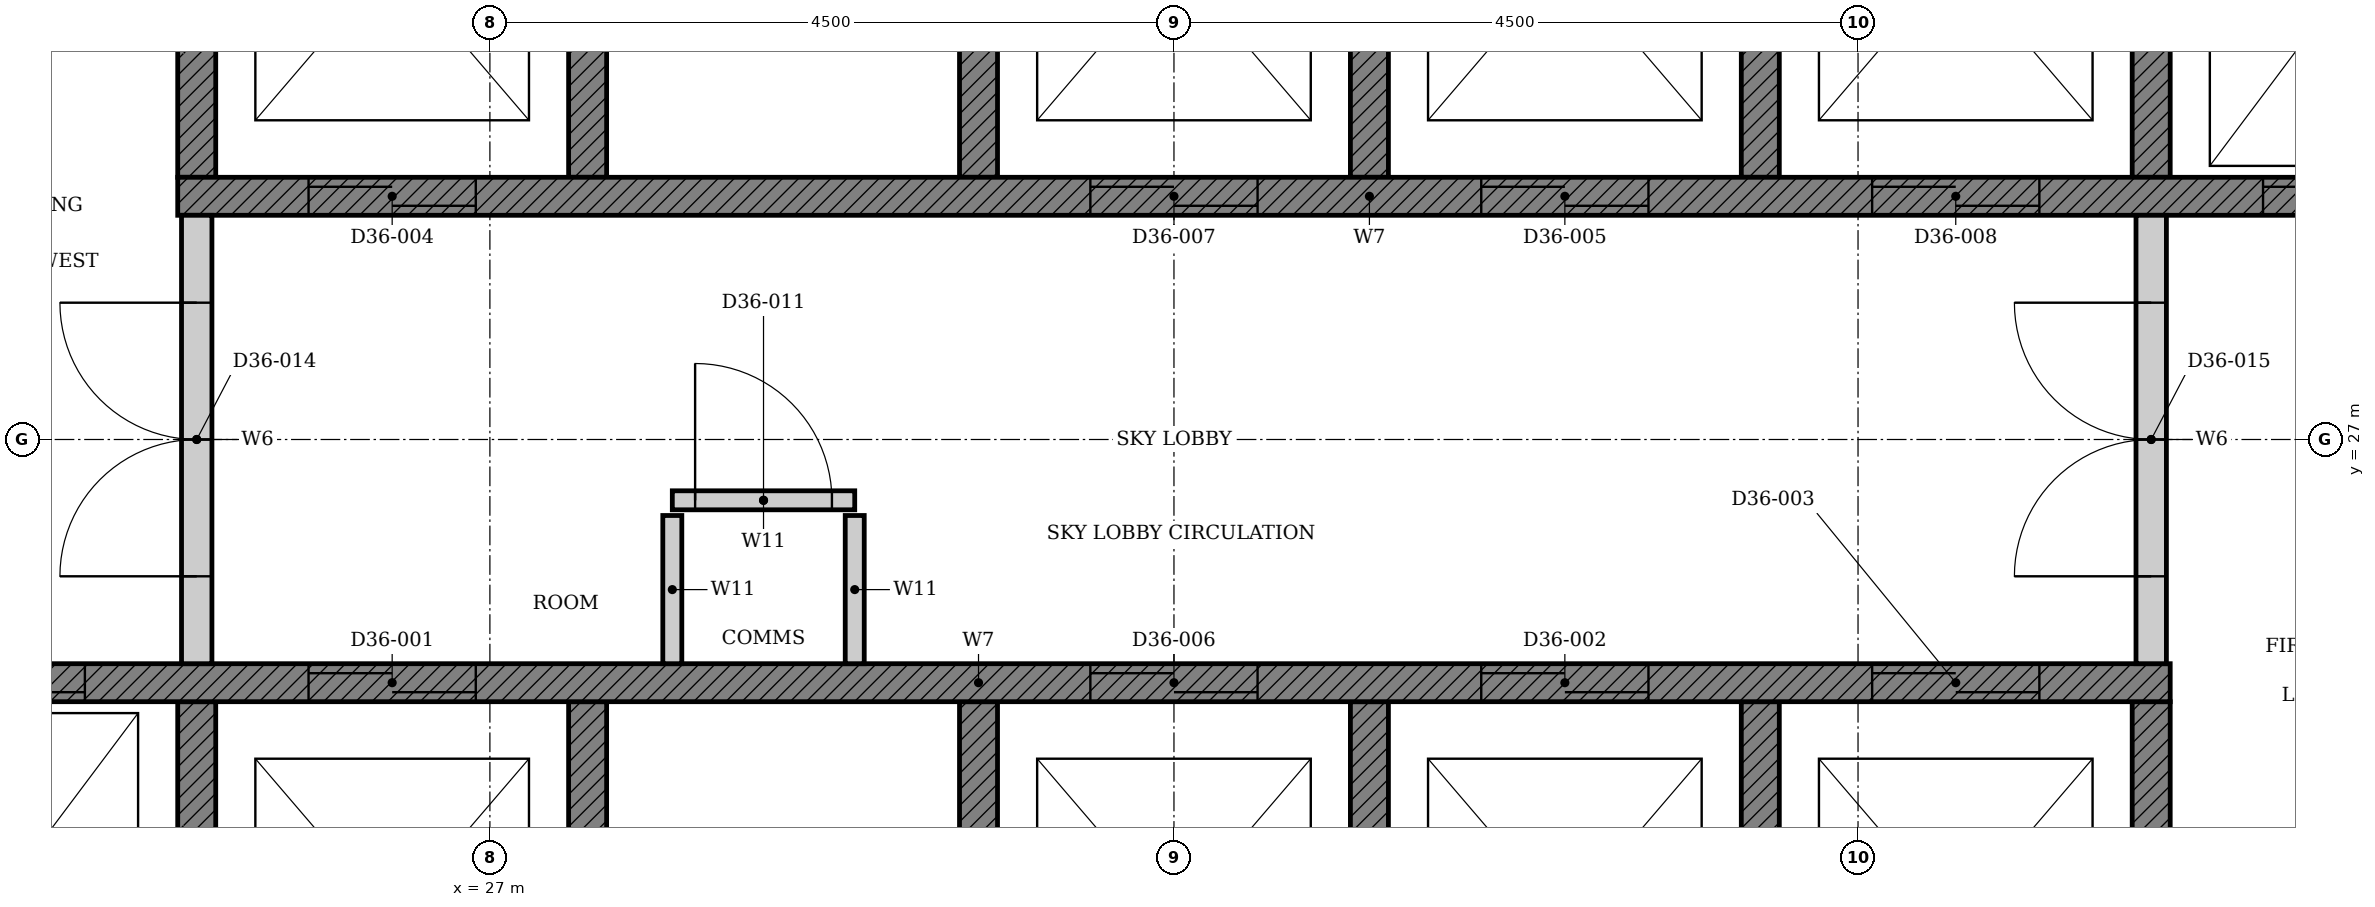
"""IFC4 building model, lengths in metres.
Left out: names, types, materials, properties, quantities, classifications, styles, units other than length and angle.
Written with IfcOpenShell. Run it as: python <this file> out.ifc"""

import sys

from ifc_helpers import new_model, si_unit, direction, frame, frame_2d, origin, place, context, subcontext, project, spatial, polyline, rectangle, outline, extrude, element, fill, save


model = new_model("IFC4")
c1 = context("Model", 3, precision=1e-05, world=origin(), true_north=direction((0.0, 1.0)))
c2 = subcontext(c1, "Body", "Model", "MODEL_VIEW")
j1 = project(units=[si_unit("LENGTHUNIT", "METRE"), si_unit("PLANEANGLEUNIT", "RADIAN")], contexts=[c1])
p1 = place(None, origin())
s1 = spatial("IfcSite", under=j1, at=p1, CompositionType="ELEMENT")
p2 = place(p1, origin())
s2 = spatial("IfcBuilding", under=s1, at=p2, CompositionType="ELEMENT")
p3 = place(p2, frame((0.0, 0.0, 145.2)))
s3 = spatial("IfcBuildingStorey", under=s2, at=p3, CompositionType="ELEMENT", Elevation=145.2)
p4 = place(p3, origin())
e1 = element("IfcWall", 1, at=p4, inside=s3, PredefinedType="SHEAR", context=c2, shape_type="SweptSolid", body=[
    extrude(outline(polyline([(22.375, 22.35), (38.053, 22.35), (38.053, 25.275), (37.803, 25.275), (37.803, 22.65), (35.482, 22.65), (35.482, 25.275), (35.232, 25.275), (35.232, 22.65), (32.911, 22.65), (32.911, 25.275), (32.661, 25.275), (32.661, 22.65), (30.339, 22.65), (30.339, 25.275), (30.089, 25.275), (30.089, 22.65), (27.768, 22.65), (27.768, 25.275), (27.518, 25.275), (27.518, 22.65), (25.197, 22.65), (25.197, 25.275), (24.947, 25.275), (24.947, 22.65), (22.625, 22.65), (22.625, 25.275), (22.375, 25.275), (22.375, 22.35)])), origin(), (0.0, 0.0, 1.0), 5.1),
])
p5 = place(p3, origin())
e2 = element("IfcWall", 2, at=p5, inside=s3, PredefinedType="SHEAR", context=c2, shape_type="SweptSolid", body=[
    extrude(outline(polyline([(24.947, 28.725), (25.197, 28.725), (25.197, 31.35), (27.518, 31.35), (27.518, 28.725), (27.768, 28.725), (27.768, 31.35), (30.089, 31.35), (30.089, 28.725), (30.339, 28.725), (30.339, 31.35), (32.661, 31.35), (32.661, 28.725), (32.911, 28.725), (32.911, 31.35), (35.232, 31.35), (35.232, 28.725), (35.482, 28.725), (35.482, 31.35), (37.803, 31.35), (37.803, 28.725), (38.053, 28.725), (38.053, 31.35), (40.375, 31.35), (40.375, 28.725), (40.625, 28.725), (40.625, 31.65), (24.947, 31.65), (24.947, 28.725)])), origin(), (0.0, 0.0, 1.0), 5.1),
])
p6 = place(p3, frame((22.375, 25.4, 0.0), z_axis=(0.0, 0.0, 1.0), x_axis=(1.0, 0.0, 0.0)))
e3 = element("IfcWall", 3, at=p6, inside=s3, PredefinedType="SHEAR", context=c2, shape_type="SweptSolid", body=[
    extrude(rectangle(XDim=15.678, YDim=0.25, at=frame_2d((7.839, 0.0))), origin(), (0.0, 0.0, 1.0), 5.1),
])
p7 = place(p6, frame((3.432, 0.0, 0.0)))
e4 = element("IfcOpeningElement", 4, at=p7, cuts=e3, PredefinedType="OPENING", context=c2, shape_type="SweptSolid", body=[
    extrude(rectangle(XDim=1.1, YDim=2.1, at=frame_2d((0.55, 1.05))), frame((0.0, 0.135, 0.0), z_axis=(0.0, -1.0, 0.0), x_axis=(1.0, 0.0, 0.0)), (0.0, 0.0, 1.0), 0.27),
])
p8 = place(p6, frame((11.146, 0.0, 0.0)))
e5 = element("IfcOpeningElement", 5, at=p8, cuts=e3, PredefinedType="OPENING", context=c2, shape_type="SweptSolid", body=[
    extrude(rectangle(XDim=1.1, YDim=2.1, at=frame_2d((0.55, 1.05))), frame((0.0, 0.135, 0.0), z_axis=(0.0, -1.0, 0.0), x_axis=(1.0, 0.0, 0.0)), (0.0, 0.0, 1.0), 0.27),
])
p9 = place(p6, frame((13.718, 0.0, 0.0)))
e6 = element("IfcOpeningElement", 6, at=p9, cuts=e3, PredefinedType="OPENING", context=c2, shape_type="SweptSolid", body=[
    extrude(rectangle(XDim=1.1, YDim=2.1, at=frame_2d((0.55, 1.05))), frame((0.0, 0.135, 0.0), z_axis=(0.0, -1.0, 0.0), x_axis=(1.0, 0.0, 0.0)), (0.0, 0.0, 1.0), 0.27),
])
p10 = place(p6, frame((8.575, 0.0, 0.0)))
e7 = element("IfcOpeningElement", 7, at=p10, cuts=e3, PredefinedType="OPENING", context=c2, shape_type="SweptSolid", body=[
    extrude(rectangle(XDim=1.1, YDim=2.1, at=frame_2d((0.55, 1.05))), frame((0.0, 0.135, 0.0), z_axis=(0.0, -1.0, 0.0), x_axis=(1.0, 0.0, 0.0)), (0.0, 0.0, 1.0), 0.27),
])
p11 = place(p6, frame((0.861, 0.0, 0.0)))
e8 = element("IfcOpeningElement", 8, at=p11, cuts=e3, PredefinedType="OPENING", context=c2, shape_type="SweptSolid", body=[
    extrude(rectangle(XDim=1.1, YDim=2.1, at=frame_2d((0.55, 1.05))), frame((0.0, 0.135, 0.0), z_axis=(0.0, -1.0, 0.0), x_axis=(1.0, 0.0, 0.0)), (0.0, 0.0, 1.0), 0.27),
])
p12 = place(p3, frame((24.947, 28.6, 0.0), z_axis=(0.0, 0.0, 1.0), x_axis=(1.0, 0.0, 0.0)))
e9 = element("IfcWall", 9, at=p12, inside=s3, PredefinedType="SHEAR", context=c2, shape_type="SweptSolid", body=[
    extrude(rectangle(XDim=15.678, YDim=0.25, at=frame_2d((7.839, 0.0))), origin(), (0.0, 0.0, 1.0), 5.1),
])
p13 = place(p12, frame((0.861, 0.0, 0.0)))
e10 = element("IfcOpeningElement", 10, at=p13, cuts=e9, PredefinedType="OPENING", context=c2, shape_type="SweptSolid", body=[
    extrude(rectangle(XDim=1.1, YDim=2.1, at=frame_2d((0.55, 1.05))), frame((0.0, 0.135, 0.0), z_axis=(0.0, -1.0, 0.0), x_axis=(1.0, 0.0, 0.0)), (0.0, 0.0, 1.0), 0.27),
])
p14 = place(p12, frame((8.575, 0.0, 0.0)))
e11 = element("IfcOpeningElement", 11, at=p14, cuts=e9, PredefinedType="OPENING", context=c2, shape_type="SweptSolid", body=[
    extrude(rectangle(XDim=1.1, YDim=2.1, at=frame_2d((0.55, 1.05))), frame((0.0, 0.135, 0.0), z_axis=(0.0, -1.0, 0.0), x_axis=(1.0, 0.0, 0.0)), (0.0, 0.0, 1.0), 0.27),
])
p15 = place(p12, frame((6.004, 0.0, 0.0)))
e12 = element("IfcOpeningElement", 12, at=p15, cuts=e9, PredefinedType="OPENING", context=c2, shape_type="SweptSolid", body=[
    extrude(rectangle(XDim=1.1, YDim=2.1, at=frame_2d((0.55, 1.05))), frame((0.0, 0.135, 0.0), z_axis=(0.0, -1.0, 0.0), x_axis=(1.0, 0.0, 0.0)), (0.0, 0.0, 1.0), 0.27),
])
p16 = place(p12, frame((11.146, 0.0, 0.0)))
e13 = element("IfcOpeningElement", 13, at=p16, cuts=e9, PredefinedType="OPENING", context=c2, shape_type="SweptSolid", body=[
    extrude(rectangle(XDim=1.1, YDim=2.1, at=frame_2d((0.55, 1.05))), frame((0.0, 0.135, 0.0), z_axis=(0.0, -1.0, 0.0), x_axis=(1.0, 0.0, 0.0)), (0.0, 0.0, 1.0), 0.27),
])
p17 = place(p12, frame((13.718, 0.0, 0.0)))
e14 = element("IfcOpeningElement", 14, at=p17, cuts=e9, PredefinedType="OPENING", context=c2, shape_type="SweptSolid", body=[
    extrude(rectangle(XDim=1.1, YDim=2.1, at=frame_2d((0.55, 1.05))), frame((0.0, 0.135, 0.0), z_axis=(0.0, -1.0, 0.0), x_axis=(1.0, 0.0, 0.0)), (0.0, 0.0, 1.0), 0.27),
])
p18 = place(p3, frame((28.2, 26.6, 0.0), z_axis=(0.0, 0.0, 1.0), x_axis=(1.0, 0.0, 0.0)))
e15 = element("IfcWall", 15, at=p18, inside=s3, PredefinedType="PARTITIONING", context=c2, shape_type="SweptSolid", body=[
    extrude(rectangle(XDim=1.2, YDim=0.125, at=frame_2d((0.6, 0.0))), origin(), (0.0, 0.0, 1.0), 5.1),
])
p19 = place(p18, frame((0.15, 0.0, 0.0)))
e16 = element("IfcOpeningElement", 16, at=p19, cuts=e15, PredefinedType="OPENING", context=c2, shape_type="SweptSolid", body=[
    extrude(rectangle(XDim=0.9, YDim=2.1, at=frame_2d((0.45, 1.05))), frame((0.0, 0.073, 0.0), z_axis=(0.0, -1.0, 0.0), x_axis=(1.0, 0.0, 0.0)), (0.0, 0.0, 1.0), 0.145),
])
for number, where, z_axis, x_axis in (
    (17, (28.2, 25.525, 0.0), (0.0, 0.0, 1.0), (0.0, 1.0, 0.0)),
    (18, (29.4, 25.525, 0.0), (0.0, 0.0, 1.0), (0.0, 1.0, 0.0)),
):
    element("IfcWall", number, at=place(p3, frame(where, z_axis=z_axis, x_axis=x_axis)), inside=s3, PredefinedType="PARTITIONING", context=c2, shape_type="SweptSolid", body=[
        extrude(rectangle(XDim=0.975, YDim=0.125, at=frame_2d((0.488, 0.0))), origin(), (0.0, 0.0, 1.0), 5.1),
    ])
p20 = place(p3, frame((25.072, 25.525, 0.0), z_axis=(0.0, 0.0, 1.0), x_axis=(0.0, 1.0, 0.0)))
e19 = element("IfcWall", 19, at=p20, inside=s3, PredefinedType="PARTITIONING", context=c2, shape_type="SweptSolid", body=[
    extrude(rectangle(XDim=2.95, YDim=0.2, at=frame_2d((1.475, 0.0))), origin(), (0.0, 0.0, 1.0), 5.1),
])
p21 = place(p20, frame((0.575, 0.0, 0.0)))
e20 = element("IfcOpeningElement", 20, at=p21, cuts=e19, PredefinedType="OPENING", context=c2, shape_type="SweptSolid", body=[
    extrude(rectangle(XDim=1.8, YDim=2.1, at=frame_2d((0.9, 1.05))), frame((0.0, 0.11, 0.0), z_axis=(0.0, -1.0, 0.0), x_axis=(1.0, 0.0, 0.0)), (0.0, 0.0, 1.0), 0.22),
])
p22 = place(p3, frame((37.928, 25.525, 0.0), z_axis=(0.0, 0.0, 1.0), x_axis=(0.0, 1.0, 0.0)))
e21 = element("IfcWall", 21, at=p22, inside=s3, PredefinedType="PARTITIONING", context=c2, shape_type="SweptSolid", body=[
    extrude(rectangle(XDim=2.95, YDim=0.2, at=frame_2d((1.475, 0.0))), origin(), (0.0, 0.0, 1.0), 5.1),
])
p23 = place(p22, frame((0.575, 0.0, 0.0)))
e22 = element("IfcOpeningElement", 22, at=p23, cuts=e21, PredefinedType="OPENING", context=c2, shape_type="SweptSolid", body=[
    extrude(rectangle(XDim=1.8, YDim=2.1, at=frame_2d((0.9, 1.05))), frame((0.0, 0.11, 0.0), z_axis=(0.0, -1.0, 0.0), x_axis=(1.0, 0.0, 0.0)), (0.0, 0.0, 1.0), 0.22),
])
p24 = place(p7, origin())
e23 = element("IfcDoor", 23, at=p24, inside=s3, OperationType="DOUBLE_DOOR_SLIDING", PredefinedType="DOOR", context=c2, shape_type="SweptSolid", body=[
    extrude(rectangle(XDim=1.1, YDim=2.1, at=frame_2d((0.55, 1.05))), frame((0.0, 0.025, 0.0), z_axis=(0.0, -1.0, 0.0), x_axis=(1.0, 0.0, 0.0)), (0.0, 0.0, 1.0), 0.05),
])
fill(e4, e23)
p25 = place(p8, origin())
e24 = element("IfcDoor", 24, at=p25, inside=s3, OperationType="DOUBLE_DOOR_SLIDING", PredefinedType="DOOR", context=c2, shape_type="SweptSolid", body=[
    extrude(rectangle(XDim=1.1, YDim=2.1, at=frame_2d((0.55, 1.05))), frame((0.0, 0.025, 0.0), z_axis=(0.0, -1.0, 0.0), x_axis=(1.0, 0.0, 0.0)), (0.0, 0.0, 1.0), 0.05),
])
fill(e5, e24)
p26 = place(p9, origin())
e25 = element("IfcDoor", 25, at=p26, inside=s3, OperationType="DOUBLE_DOOR_SLIDING", PredefinedType="DOOR", context=c2, shape_type="SweptSolid", body=[
    extrude(rectangle(XDim=1.1, YDim=2.1, at=frame_2d((0.55, 1.05))), frame((0.0, 0.025, 0.0), z_axis=(0.0, -1.0, 0.0), x_axis=(1.0, 0.0, 0.0)), (0.0, 0.0, 1.0), 0.05),
])
fill(e6, e25)
p27 = place(p13, origin())
e26 = element("IfcDoor", 26, at=p27, inside=s3, OperationType="DOUBLE_DOOR_SLIDING", PredefinedType="DOOR", context=c2, shape_type="SweptSolid", body=[
    extrude(rectangle(XDim=1.1, YDim=2.1, at=frame_2d((0.55, 1.05))), frame((0.0, 0.025, 0.0), z_axis=(0.0, -1.0, 0.0), x_axis=(1.0, 0.0, 0.0)), (0.0, 0.0, 1.0), 0.05),
])
fill(e10, e26)
p28 = place(p14, origin())
e27 = element("IfcDoor", 27, at=p28, inside=s3, OperationType="DOUBLE_DOOR_SLIDING", PredefinedType="DOOR", context=c2, shape_type="SweptSolid", body=[
    extrude(rectangle(XDim=1.1, YDim=2.1, at=frame_2d((0.55, 1.05))), frame((0.0, 0.025, 0.0), z_axis=(0.0, -1.0, 0.0), x_axis=(1.0, 0.0, 0.0)), (0.0, 0.0, 1.0), 0.05),
])
fill(e11, e27)
p29 = place(p10, origin())
e28 = element("IfcDoor", 28, at=p29, inside=s3, OperationType="DOUBLE_DOOR_SLIDING", PredefinedType="DOOR", context=c2, shape_type="SweptSolid", body=[
    extrude(rectangle(XDim=1.1, YDim=2.1, at=frame_2d((0.55, 1.05))), frame((0.0, 0.025, 0.0), z_axis=(0.0, -1.0, 0.0), x_axis=(1.0, 0.0, 0.0)), (0.0, 0.0, 1.0), 0.05),
])
fill(e7, e28)
p30 = place(p15, origin())
e29 = element("IfcDoor", 29, at=p30, inside=s3, OperationType="DOUBLE_DOOR_SLIDING", PredefinedType="DOOR", context=c2, shape_type="SweptSolid", body=[
    extrude(rectangle(XDim=1.1, YDim=2.1, at=frame_2d((0.55, 1.05))), frame((0.0, 0.025, 0.0), z_axis=(0.0, -1.0, 0.0), x_axis=(1.0, 0.0, 0.0)), (0.0, 0.0, 1.0), 0.05),
])
fill(e12, e29)
p31 = place(p16, origin())
e30 = element("IfcDoor", 30, at=p31, inside=s3, OperationType="DOUBLE_DOOR_SLIDING", PredefinedType="DOOR", context=c2, shape_type="SweptSolid", body=[
    extrude(rectangle(XDim=1.1, YDim=2.1, at=frame_2d((0.55, 1.05))), frame((0.0, 0.025, 0.0), z_axis=(0.0, -1.0, 0.0), x_axis=(1.0, 0.0, 0.0)), (0.0, 0.0, 1.0), 0.05),
])
fill(e13, e30)
p32 = place(p11, origin())
e31 = element("IfcDoor", 31, at=p32, inside=s3, OperationType="DOUBLE_DOOR_SLIDING", PredefinedType="DOOR", context=c2, shape_type="SweptSolid", body=[
    extrude(rectangle(XDim=1.1, YDim=2.1, at=frame_2d((0.55, 1.05))), frame((0.0, 0.025, 0.0), z_axis=(0.0, -1.0, 0.0), x_axis=(1.0, 0.0, 0.0)), (0.0, 0.0, 1.0), 0.05),
])
fill(e8, e31)
p33 = place(p17, origin())
e32 = element("IfcDoor", 32, at=p33, inside=s3, OperationType="DOUBLE_DOOR_SLIDING", PredefinedType="DOOR", context=c2, shape_type="SweptSolid", body=[
    extrude(rectangle(XDim=1.1, YDim=2.1, at=frame_2d((0.55, 1.05))), frame((0.0, 0.025, 0.0), z_axis=(0.0, -1.0, 0.0), x_axis=(1.0, 0.0, 0.0)), (0.0, 0.0, 1.0), 0.05),
])
fill(e14, e32)
p34 = place(p19, origin())
e33 = element("IfcDoor", 33, at=p34, inside=s3, OperationType="SINGLE_SWING_LEFT", PredefinedType="DOOR", context=c2, shape_type="SweptSolid", body=[
    extrude(rectangle(XDim=0.9, YDim=2.1, at=frame_2d((0.45, 1.05))), frame((0.0, 0.025, 0.0), z_axis=(0.0, -1.0, 0.0), x_axis=(1.0, 0.0, 0.0)), (0.0, 0.0, 1.0), 0.05),
])
fill(e16, e33)
p35 = place(p21, origin())
e34 = element("IfcDoor", 34, at=p35, inside=s3, OperationType="DOUBLE_DOOR_SINGLE_SWING", PredefinedType="DOOR", context=c2, shape_type="SweptSolid", body=[
    extrude(rectangle(XDim=1.8, YDim=2.1, at=frame_2d((0.9, 1.05))), frame((0.0, 0.025, 0.0), z_axis=(0.0, -1.0, 0.0), x_axis=(1.0, 0.0, 0.0)), (0.0, 0.0, 1.0), 0.05),
])
fill(e20, e34)
p36 = place(p23, origin())
e35 = element("IfcDoor", 35, at=p36, inside=s3, OperationType="DOUBLE_DOOR_SINGLE_SWING", PredefinedType="DOOR", context=c2, shape_type="SweptSolid", body=[
    extrude(rectangle(XDim=1.8, YDim=2.1, at=frame_2d((0.9, 1.05))), frame((0.0, 0.025, 0.0), z_axis=(0.0, -1.0, 0.0), x_axis=(1.0, 0.0, 0.0)), (0.0, 0.0, 1.0), 0.05),
])
fill(e22, e35)
save(model, sys.argv[1])
